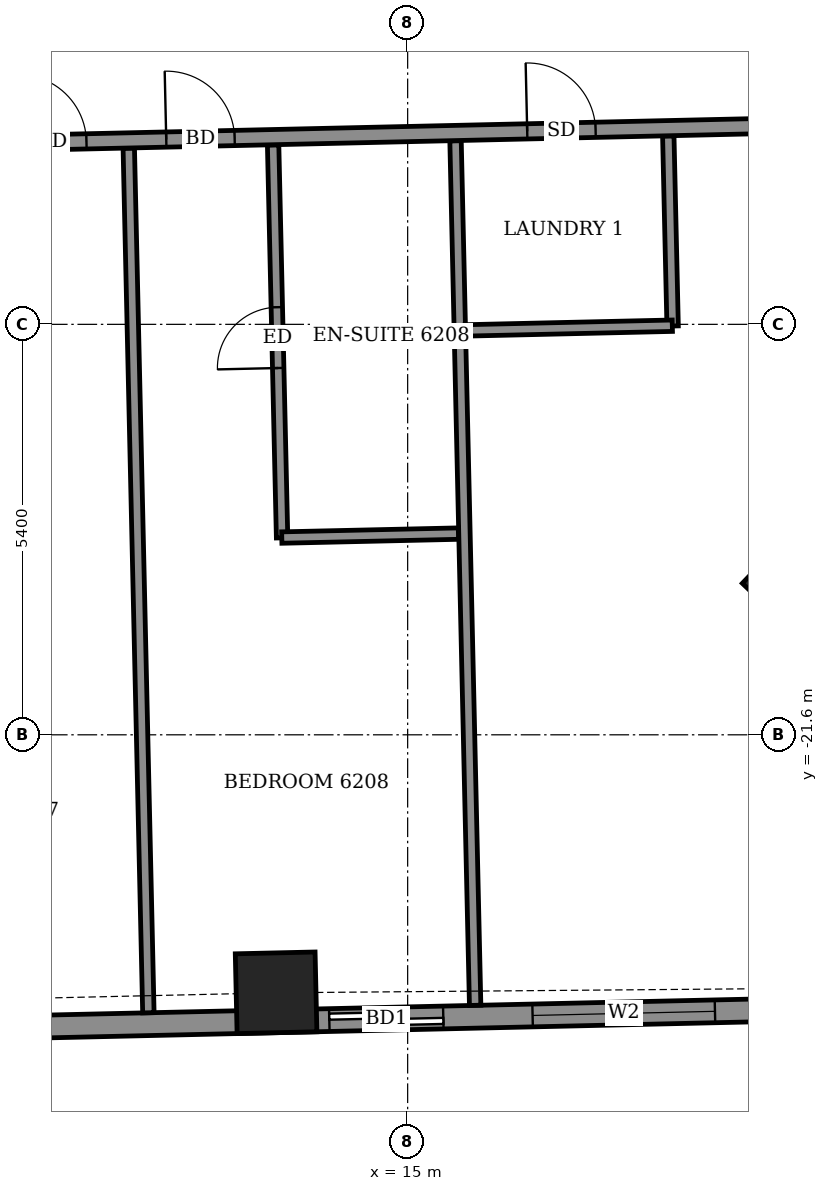
"""IFC4 building model, lengths in metres.
Left out: names, types, materials, properties, quantities, classifications, styles, units other than length and angle.
Written with IfcOpenShell. Run it as: python <this file> out.ifc"""

import sys

from ifc_helpers import new_model, si_unit, direction, frame, frame_2d, origin, origin_2d, place, context, subcontext, project, spatial, rectangle, extrude, element, fill, save


model = new_model("IFC4")
c1 = context("Model", 3, precision=1e-05, world=origin(), true_north=direction((0.0, 1.0)))
c2 = subcontext(c1, "Body", "Model", "MODEL_VIEW")
j1 = project(units=[si_unit("LENGTHUNIT", "METRE"), si_unit("PLANEANGLEUNIT", "RADIAN")], contexts=[c1])
p1 = place(None, origin())
s1 = spatial("IfcSite", under=j1, at=p1, CompositionType="ELEMENT")
p2 = place(p1, origin())
s2 = spatial("IfcBuilding", under=s1, at=p2, CompositionType="ELEMENT")
p3 = place(p2, frame((0.0, 0.0, 245.5)))
s3 = spatial("IfcBuildingStorey", under=s2, at=p3, CompositionType="ELEMENT", Elevation=245.5)
for number, where, z_axis, x_axis in (
    (1, (13.269, -24.994, -0.55), (0.0, 0.0, 1.0), (1.0, 0.023, 0.0)),
    (2, (20.146, -19.59, -0.55), (0.0, 0.0, 1.0), (0.691, 0.723, 0.0)),
):
    element("IfcColumn", number, at=place(p3, frame(where, z_axis=z_axis, x_axis=x_axis)), inside=s3, PredefinedType="COLUMN", context=c2, shape_type="SweptSolid", body=[
        extrude(rectangle(XDim=1.05, YDim=1.05, at=origin_2d()), origin(), (0.0, 0.0, 1.0), 3.6),
    ])
p4 = place(p3, frame((-23.403, -26.201, 0.0), z_axis=(0.0, 0.0, 1.0), x_axis=(0.999742770494, 0.022680230258, 0.0)))
e3 = element("IfcWall", 3, at=p4, inside=s3, PredefinedType="SOLIDWALL", context=c2, shape_type="SweptSolid", body=[
    extrude(rectangle(XDim=43.908, YDim=0.3, at=frame_2d((21.954, 0.0))), origin(), (0.0, 0.0, 1.0), 2.55),
])
p5 = place(p4, frame((1.951, 0.0, 0.0)))
e4 = element("IfcOpeningElement", 4, at=p5, cuts=e3, PredefinedType="OPENING", context=c2, shape_type="SweptSolid", body=[
    extrude(rectangle(XDim=1.5, YDim=2.4, at=frame_2d((0.75, 1.2))), frame((0.0, 0.16, 0.0), z_axis=(0.0, -1.0, 0.0), x_axis=(1.0, 0.0, 0.0)), (0.0, 0.0, 1.0), 0.32),
])
p6 = place(p4, frame((5.272, 0.0, 0.0)))
e5 = element("IfcOpeningElement", 5, at=p6, cuts=e3, PredefinedType="OPENING", context=c2, shape_type="SweptSolid", body=[
    extrude(rectangle(XDim=1.2, YDim=2.4, at=frame_2d((0.6, 1.2))), frame((0.0, 0.16, 0.0), z_axis=(0.0, -1.0, 0.0), x_axis=(1.0, 0.0, 0.0)), (0.0, 0.0, 1.0), 0.32),
])
p7 = place(p4, frame((10.475, 0.0, 0.0)))
e6 = element("IfcOpeningElement", 6, at=p7, cuts=e3, PredefinedType="OPENING", context=c2, shape_type="SweptSolid", body=[
    extrude(rectangle(XDim=1.5, YDim=2.4, at=frame_2d((0.75, 1.2))), frame((0.0, 0.16, 0.0), z_axis=(0.0, -1.0, 0.0), x_axis=(1.0, 0.0, 0.0)), (0.0, 0.0, 1.0), 0.32),
])
p8 = place(p4, frame((15.53, 0.0, 0.0)))
e7 = element("IfcOpeningElement", 7, at=p8, cuts=e3, PredefinedType="OPENING", context=c2, shape_type="SweptSolid", body=[
    extrude(rectangle(XDim=1.5, YDim=2.4, at=frame_2d((0.75, 1.2))), frame((0.0, 0.16, 0.0), z_axis=(0.0, -1.0, 0.0), x_axis=(1.0, 0.0, 0.0)), (0.0, 0.0, 1.0), 0.32),
])
p9 = place(p4, frame((18.939, 0.0, 0.0)))
e8 = element("IfcOpeningElement", 8, at=p9, cuts=e3, PredefinedType="OPENING", context=c2, shape_type="SweptSolid", body=[
    extrude(rectangle(XDim=1.5, YDim=2.4, at=frame_2d((0.75, 1.2))), frame((0.0, 0.16, 0.0), z_axis=(0.0, -1.0, 0.0), x_axis=(1.0, 0.0, 0.0)), (0.0, 0.0, 1.0), 0.32),
])
p10 = place(p4, frame((23.489, 0.0, 0.0)))
e9 = element("IfcOpeningElement", 9, at=p10, cuts=e3, PredefinedType="OPENING", context=c2, shape_type="SweptSolid", body=[
    extrude(rectangle(XDim=1.5, YDim=2.4, at=frame_2d((0.75, 1.2))), frame((0.0, 0.16, 0.0), z_axis=(0.0, -1.0, 0.0), x_axis=(1.0, 0.0, 0.0)), (0.0, 0.0, 1.0), 0.32),
])
p11 = place(p4, frame((26.898, 0.0, 0.0)))
e10 = element("IfcOpeningElement", 10, at=p11, cuts=e3, PredefinedType="OPENING", context=c2, shape_type="SweptSolid", body=[
    extrude(rectangle(XDim=1.5, YDim=2.4, at=frame_2d((0.75, 1.2))), frame((0.0, 0.16, 0.0), z_axis=(0.0, -1.0, 0.0), x_axis=(1.0, 0.0, 0.0)), (0.0, 0.0, 1.0), 0.32),
])
p12 = place(p4, frame((32.05, 0.0, 0.0)))
e11 = element("IfcOpeningElement", 11, at=p12, cuts=e3, PredefinedType="OPENING", context=c2, shape_type="SweptSolid", body=[
    extrude(rectangle(XDim=1.5, YDim=2.4, at=frame_2d((0.75, 1.2))), frame((0.0, 0.16, 0.0), z_axis=(0.0, -1.0, 0.0), x_axis=(1.0, 0.0, 0.0)), (0.0, 0.0, 1.0), 0.32),
])
p13 = place(p4, frame((37.382, 0.0, 0.0)))
e12 = element("IfcOpeningElement", 12, at=p13, cuts=e3, PredefinedType="OPENING", context=c2, shape_type="SweptSolid", body=[
    extrude(rectangle(XDim=1.5, YDim=2.4, at=frame_2d((0.75, 1.2))), frame((0.0, 0.16, 0.0), z_axis=(0.0, -1.0, 0.0), x_axis=(1.0, 0.0, 0.0)), (0.0, 0.0, 1.0), 0.32),
])
p14 = place(p4, frame((40.057, 0.0, 0.9)))
e13 = element("IfcOpeningElement", 13, at=p14, cuts=e3, PredefinedType="OPENING", context=c2, shape_type="SweptSolid", body=[
    extrude(rectangle(XDim=2.4, YDim=1.5, at=frame_2d((1.2, 0.75))), frame((0.0, 0.16, 0.0), z_axis=(0.0, -1.0, 0.0), x_axis=(1.0, 0.0, 0.0)), (0.0, 0.0, 1.0), 0.32),
])
p15 = place(p3, frame((11.589, -25.257, 0.0), z_axis=(0.0, 0.0, 1.0), x_axis=(-0.022684355347, 0.999742676904, 0.0)))
e14 = element("IfcWall", 14, at=p15, inside=s3, PredefinedType="PARTITIONING", context=c2, shape_type="SweptSolid", body=[
    extrude(rectangle(XDim=11.376, YDim=0.15, at=frame_2d((5.688, 0.0))), origin(), (0.0, 0.0, 1.0), 2.5),
])
p16 = place(p3, frame((15.888, -25.159, 0.0), z_axis=(0.0, 0.0, 1.0), x_axis=(-0.022684355347, 0.999742676904, 0.0)))
e15 = element("IfcWall", 15, at=p16, inside=s3, PredefinedType="PARTITIONING", context=c2, shape_type="SweptSolid", body=[
    extrude(rectangle(XDim=11.376, YDim=0.15, at=frame_2d((5.688, 0.0))), origin(), (0.0, 0.0, 1.0), 2.55),
])
p17 = place(p3, frame((13.348, -19.009, 0.0), z_axis=(0.0, 0.0, 1.0), x_axis=(-0.022811522835, 0.999739783357, 0.0)))
e16 = element("IfcWall", 16, at=p17, inside=s3, PredefinedType="PARTITIONING", context=c2, shape_type="SweptSolid", body=[
    extrude(rectangle(XDim=5.169, YDim=0.15, at=frame_2d((2.585, 0.0))), origin(), (0.0, 0.0, 1.0), 3.05),
])
p18 = place(p17, frame((2.235, 0.0, 0.0)))
e17 = element("IfcOpeningElement", 17, at=p18, cuts=e16, PredefinedType="OPENING", context=c2, shape_type="SweptSolid", body=[
    extrude(rectangle(XDim=0.8, YDim=2.1, at=frame_2d((0.4, 1.05))), frame((0.0, 0.085, 0.0), z_axis=(0.0, -1.0, 0.0), x_axis=(1.0, 0.0, 0.0)), (0.0, 0.0, 1.0), 0.17),
])
p19 = place(p3, frame((13.344, -19.005, 0.0), z_axis=(0.0, 0.0, 1.0), x_axis=(0.999749744571, 0.022370700241, 0.0)))
e18 = element("IfcWall", 18, at=p19, inside=s3, PredefinedType="PARTITIONING", context=c2, shape_type="SweptSolid", body=[
    extrude(rectangle(XDim=2.324, YDim=0.15, at=frame_2d((1.162, 0.0))), origin(), (0.0, 0.0, 1.0), 3.05),
])
p20 = place(p3, frame((18.486, -16.222, 0.0), z_axis=(0.0, 0.0, 1.0), x_axis=(-0.022854521249, 0.999738801317, 0.0)))
e19 = element("IfcWall", 19, at=p20, inside=s3, PredefinedType="PARTITIONING", context=c2, shape_type="SweptSolid", body=[
    extrude(rectangle(XDim=2.5, YDim=0.15, at=frame_2d((1.25, 0.0))), origin(), (0.0, 0.0, 1.0), 3.05),
])
p21 = place(p3, frame((15.757, -16.28, 0.0), z_axis=(0.0, 0.0, 1.0), x_axis=(0.99974114142, 0.022751926344, 0.0)))
e20 = element("IfcWall", 20, at=p21, inside=s3, PredefinedType="PARTITIONING", context=c2, shape_type="SweptSolid", body=[
    extrude(rectangle(XDim=2.726, YDim=0.15, at=frame_2d((1.363, 0.0))), origin(), (0.0, 0.0, 1.0), 3.05),
])
p22 = place(p3, frame((-27.016, -14.65, 0.0), z_axis=(0.0, 0.0, 1.0), x_axis=(0.999742874861, 0.022675629315, 0.0)))
e21 = element("IfcWall", 21, at=p22, inside=s3, PredefinedType="PARTITIONING", context=c2, shape_type="SweptSolid", body=[
    extrude(rectangle(XDim=50.883, YDim=0.2, at=frame_2d((25.442, 0.0))), origin(), (0.0, 0.0, 1.0), 3.05),
])
p23 = place(p22, frame((1.575, 0.0, 0.0)))
e22 = element("IfcOpeningElement", 22, at=p23, cuts=e21, PredefinedType="OPENING", context=c2, shape_type="SweptSolid", body=[
    extrude(rectangle(XDim=1.0, YDim=2.1, at=frame_2d((0.5, 1.05))), frame((0.0, 0.11, 0.0), z_axis=(0.0, -1.0, 0.0), x_axis=(1.0, 0.0, 0.0)), (0.0, 0.0, 1.0), 0.22),
])
p24 = place(p22, frame((6.4, 0.0, 0.0)))
e23 = element("IfcOpeningElement", 23, at=p24, cuts=e21, PredefinedType="OPENING", context=c2, shape_type="SweptSolid", body=[
    extrude(rectangle(XDim=0.9, YDim=2.1, at=frame_2d((0.45, 1.05))), frame((0.0, 0.11, 0.0), z_axis=(0.0, -1.0, 0.0), x_axis=(1.0, 0.0, 0.0)), (0.0, 0.0, 1.0), 0.22),
])
p25 = place(p22, frame((11.025, 0.0, 0.0)))
e24 = element("IfcOpeningElement", 24, at=p25, cuts=e21, PredefinedType="OPENING", context=c2, shape_type="SweptSolid", body=[
    extrude(rectangle(XDim=0.9, YDim=2.1, at=frame_2d((0.45, 1.05))), frame((0.0, 0.11, 0.0), z_axis=(0.0, -1.0, 0.0), x_axis=(1.0, 0.0, 0.0)), (0.0, 0.0, 1.0), 0.22),
])
p26 = place(p22, frame((12.925, 0.0, 0.0)))
e25 = element("IfcOpeningElement", 25, at=p26, cuts=e21, PredefinedType="OPENING", context=c2, shape_type="SweptSolid", body=[
    extrude(rectangle(XDim=0.9, YDim=2.1, at=frame_2d((0.45, 1.05))), frame((0.0, 0.11, 0.0), z_axis=(0.0, -1.0, 0.0), x_axis=(1.0, 0.0, 0.0)), (0.0, 0.0, 1.0), 0.22),
])
p27 = place(p22, frame((19.65, 0.0, 0.0)))
e26 = element("IfcOpeningElement", 26, at=p27, cuts=e21, PredefinedType="OPENING", context=c2, shape_type="SweptSolid", body=[
    extrude(rectangle(XDim=0.9, YDim=2.1, at=frame_2d((0.45, 1.05))), frame((0.0, 0.11, 0.0), z_axis=(0.0, -1.0, 0.0), x_axis=(1.0, 0.0, 0.0)), (0.0, 0.0, 1.0), 0.22),
])
p28 = place(p22, frame((21.575, 0.0, 0.0)))
e27 = element("IfcOpeningElement", 27, at=p28, cuts=e21, PredefinedType="OPENING", context=c2, shape_type="SweptSolid", body=[
    extrude(rectangle(XDim=0.9, YDim=2.1, at=frame_2d((0.45, 1.05))), frame((0.0, 0.11, 0.0), z_axis=(0.0, -1.0, 0.0), x_axis=(1.0, 0.0, 0.0)), (0.0, 0.0, 1.0), 0.22),
])
p29 = place(p22, frame((28.25, 0.0, 0.0)))
e28 = element("IfcOpeningElement", 28, at=p29, cuts=e21, PredefinedType="OPENING", context=c2, shape_type="SweptSolid", body=[
    extrude(rectangle(XDim=0.9, YDim=2.1, at=frame_2d((0.45, 1.05))), frame((0.0, 0.11, 0.0), z_axis=(0.0, -1.0, 0.0), x_axis=(1.0, 0.0, 0.0)), (0.0, 0.0, 1.0), 0.22),
])
p30 = place(p22, frame((30.125, 0.0, 0.0)))
e29 = element("IfcOpeningElement", 29, at=p30, cuts=e21, PredefinedType="OPENING", context=c2, shape_type="SweptSolid", body=[
    extrude(rectangle(XDim=0.9, YDim=2.1, at=frame_2d((0.45, 1.05))), frame((0.0, 0.11, 0.0), z_axis=(0.0, -1.0, 0.0), x_axis=(1.0, 0.0, 0.0)), (0.0, 0.0, 1.0), 0.22),
])
p31 = place(p22, frame((36.9, 0.0, 0.0)))
e30 = element("IfcOpeningElement", 30, at=p31, cuts=e21, PredefinedType="OPENING", context=c2, shape_type="SweptSolid", body=[
    extrude(rectangle(XDim=0.9, YDim=2.1, at=frame_2d((0.45, 1.05))), frame((0.0, 0.11, 0.0), z_axis=(0.0, -1.0, 0.0), x_axis=(1.0, 0.0, 0.0)), (0.0, 0.0, 1.0), 0.22),
])
p32 = place(p22, frame((38.85, 0.0, 0.0)))
e31 = element("IfcOpeningElement", 31, at=p32, cuts=e21, PredefinedType="OPENING", context=c2, shape_type="SweptSolid", body=[
    extrude(rectangle(XDim=0.9, YDim=2.1, at=frame_2d((0.45, 1.05))), frame((0.0, 0.11, 0.0), z_axis=(0.0, -1.0, 0.0), x_axis=(1.0, 0.0, 0.0)), (0.0, 0.0, 1.0), 0.22),
])
p33 = place(p22, frame((48.629, 0.0, 0.0)))
e32 = element("IfcOpeningElement", 32, at=p33, cuts=e21, PredefinedType="OPENING", context=c2, shape_type="SweptSolid", body=[
    extrude(rectangle(XDim=1.0, YDim=2.1, at=frame_2d((0.5, 1.05))), frame((0.0, 0.11, 0.0), z_axis=(0.0, -1.0, 0.0), x_axis=(1.0, 0.0, 0.0)), (0.0, 0.0, 1.0), 0.22),
])
p34 = place(p22, frame((43.6, 0.0, 0.0)))
e33 = element("IfcOpeningElement", 33, at=p34, cuts=e21, PredefinedType="OPENING", context=c2, shape_type="SweptSolid", body=[
    extrude(rectangle(XDim=0.9, YDim=2.1, at=frame_2d((0.45, 1.05))), frame((0.0, 0.11, 0.0), z_axis=(0.0, -1.0, 0.0), x_axis=(1.0, 0.0, 0.0)), (0.0, 0.0, 1.0), 0.22),
])
p35 = place(p13, origin())
e34 = element("IfcDoor", 34, at=p35, inside=s3, OperationType="SLIDING_TO_LEFT", PredefinedType="DOOR", context=c2, shape_type="SweptSolid", body=[
    extrude(rectangle(XDim=1.5, YDim=2.4, at=frame_2d((0.75, 1.2))), frame((0.0, 0.025, 0.0), z_axis=(0.0, -1.0, 0.0), x_axis=(1.0, 0.0, 0.0)), (0.0, 0.0, 1.0), 0.05),
])
fill(e12, e34)
p36 = place(p14, origin())
e35 = element("IfcWindow", 35, at=p36, inside=s3, PartitioningType="DOUBLE_PANEL_VERTICAL", PredefinedType="WINDOW", context=c2, shape_type="SweptSolid", body=[
    extrude(rectangle(XDim=2.4, YDim=1.5, at=frame_2d((1.2, 0.75))), frame((0.0, 0.03, 0.0), z_axis=(0.0, -1.0, 0.0), x_axis=(1.0, 0.0, 0.0)), (0.0, 0.0, 1.0), 0.06),
])
fill(e13, e35)
p37 = place(p31, origin())
e36 = element("IfcDoor", 36, at=p37, inside=s3, OperationType="SINGLE_SWING_LEFT", PredefinedType="DOOR", context=c2, shape_type="SweptSolid", body=[
    extrude(rectangle(XDim=0.9, YDim=2.1, at=frame_2d((0.45, 1.05))), frame((0.0, 0.025, 0.0), z_axis=(0.0, -1.0, 0.0), x_axis=(1.0, 0.0, 0.0)), (0.0, 0.0, 1.0), 0.05),
])
fill(e30, e36)
p38 = place(p32, origin())
e37 = element("IfcDoor", 37, at=p38, inside=s3, OperationType="SINGLE_SWING_RIGHT", PredefinedType="DOOR", context=c2, shape_type="SweptSolid", body=[
    extrude(rectangle(XDim=0.9, YDim=2.1, at=frame_2d((0.45, 1.05))), frame((0.0, 0.025, 0.0), z_axis=(0.0, -1.0, 0.0), x_axis=(1.0, 0.0, 0.0)), (0.0, 0.0, 1.0), 0.05),
])
fill(e31, e37)
p39 = place(p18, origin())
e38 = element("IfcDoor", 38, at=p39, inside=s3, OperationType="SINGLE_SWING_RIGHT", PredefinedType="DOOR", context=c2, shape_type="SweptSolid", body=[
    extrude(rectangle(XDim=0.8, YDim=2.1, at=frame_2d((0.4, 1.05))), frame((0.0, 0.025, 0.0), z_axis=(0.0, -1.0, 0.0), x_axis=(1.0, 0.0, 0.0)), (0.0, 0.0, 1.0), 0.05),
])
fill(e17, e38)
p40 = place(p34, origin())
e39 = element("IfcDoor", 39, at=p40, inside=s3, OperationType="SINGLE_SWING_RIGHT", PredefinedType="DOOR", context=c2, shape_type="SweptSolid", body=[
    extrude(rectangle(XDim=0.9, YDim=2.1, at=frame_2d((0.45, 1.05))), frame((0.0, 0.025, 0.0), z_axis=(0.0, -1.0, 0.0), x_axis=(1.0, 0.0, 0.0)), (0.0, 0.0, 1.0), 0.05),
])
fill(e33, e39)
save(model, sys.argv[1])
